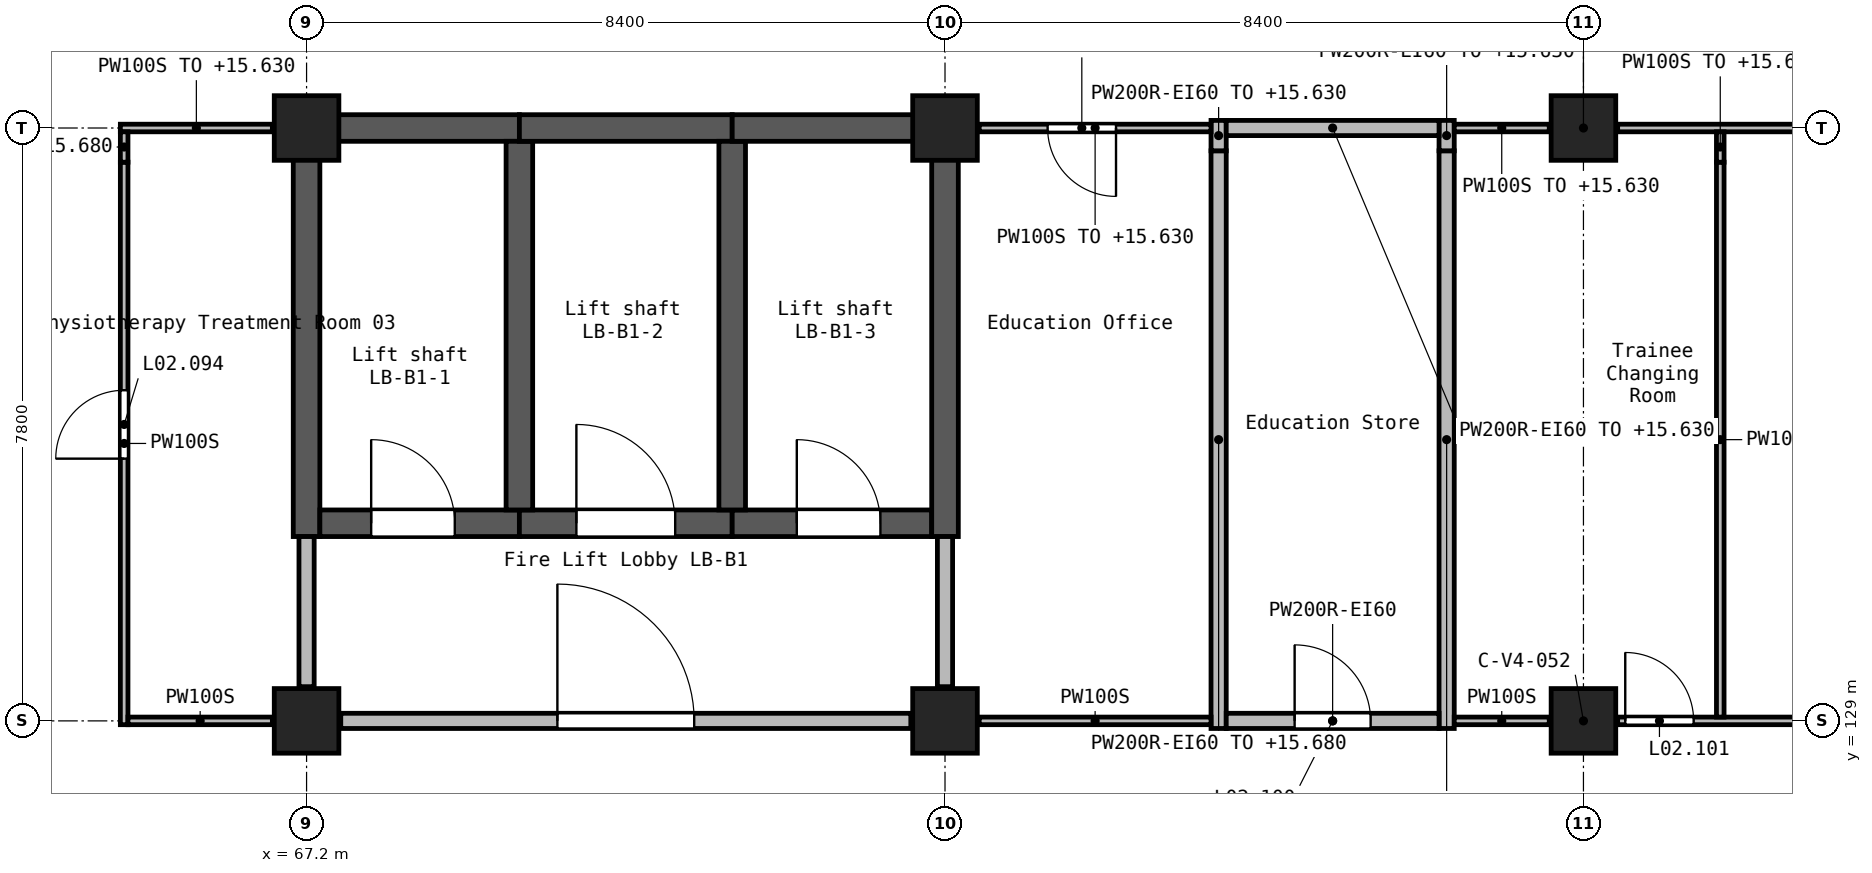
"""IFC4 building model, lengths in metres.
Left out: names, types, materials, properties, quantities, classifications, styles, units other than length and angle.
Written with IfcOpenShell. Run it as: python <this file> out.ifc"""

import sys

from ifc_helpers import new_model, si_unit, direction, frame, frame_2d, origin, origin_2d, place, context, subcontext, project, spatial, rectangle, extrude, element, fill, save


model = new_model("IFC4")
c1 = context("Model", 3, precision=1e-05, world=origin(), true_north=direction((0.0, 1.0)))
c2 = subcontext(c1, "Body", "Model", "MODEL_VIEW")
j1 = project(units=[si_unit("LENGTHUNIT", "METRE"), si_unit("PLANEANGLEUNIT", "RADIAN")], contexts=[c1])
p1 = place(None, origin())
s1 = spatial("IfcSite", under=j1, at=p1, CompositionType="ELEMENT")
p2 = place(p1, origin())
s2 = spatial("IfcBuilding", under=s1, at=p2, CompositionType="ELEMENT")
p3 = place(p2, frame((0.0, 0.0, 12.6)))
s3 = spatial("IfcBuildingStorey", under=s2, at=p3, CompositionType="ELEMENT", Elevation=12.6)
for number, where, z_axis, x_axis in (
    (1, (67.2, 129.0, 0.0), (0.0, 0.0, 1.0), (1.0, 0.0, 0.0)),
    (2, (67.2, 136.8, 0.0), (0.0, 0.0, 1.0), (1.0, 0.0, 0.0)),
    (3, (75.6, 129.0, 0.0), (0.0, 0.0, 1.0), (1.0, 0.0, 0.0)),
    (4, (75.6, 136.8, 0.0), (0.0, 0.0, 1.0), (1.0, 0.0, 0.0)),
    (5, (84.0, 129.0, 0.0), (0.0, 0.0, 1.0), (1.0, 0.0, 0.0)),
    (6, (84.0, 136.8, 0.0), (0.0, 0.0, 1.0), (1.0, 0.0, 0.0)),
):
    element("IfcColumn", number, at=place(p3, frame(where, z_axis=z_axis, x_axis=x_axis)), inside=s3, PredefinedType="COLUMN", context=c2, shape_type="SweptSolid", body=[
        extrude(rectangle(XDim=0.85, YDim=0.85, at=origin_2d()), origin(), (0.0, 0.0, 1.0), 4.2),
    ])
p4 = place(p3, frame((67.025, 136.8, 0.0), z_axis=(0.0, 0.0, 1.0), x_axis=(1.0, 0.0, 0.0)))
e7 = element("IfcWall", 7, at=p4, inside=s3, PredefinedType="SHEAR", context=c2, shape_type="SweptSolid", body=[
    extrude(rectangle(XDim=2.975, YDim=0.35, at=frame_2d((1.488, 0.0))), origin(), (0.0, 0.0, 1.0), 4.2),
])
p5 = place(p3, frame((67.2, 131.425, 0.0), z_axis=(0.0, 0.0, 1.0), x_axis=(0.0, 1.0, 0.0)))
e8 = element("IfcWall", 8, at=p5, inside=s3, PredefinedType="SHEAR", context=c2, shape_type="SweptSolid", body=[
    extrude(rectangle(XDim=5.2, YDim=0.35, at=frame_2d((2.6, 0.0))), origin(), (0.0, 0.0, 1.0), 4.2),
])
p6 = place(p3, frame((67.375, 131.6, 0.0), z_axis=(0.0, 0.0, 1.0), x_axis=(1.0, 0.0, 0.0)))
e9 = element("IfcWall", 9, at=p6, inside=s3, PredefinedType="SHEAR", context=c2, shape_type="SweptSolid", body=[
    extrude(rectangle(XDim=2.625, YDim=0.35, at=frame_2d((1.312, 0.0))), origin(), (0.0, 0.0, 1.0), 4.2),
])
p7 = place(p6, frame((0.675, 0.0, 0.0)))
e10 = element("IfcOpeningElement", 10, at=p7, cuts=e9, PredefinedType="OPENING", context=c2, shape_type="SweptSolid", body=[
    extrude(rectangle(XDim=1.1, YDim=2.1, at=frame_2d((0.55, 1.05))), frame((0.0, 0.185, 0.0), z_axis=(0.0, -1.0, 0.0), x_axis=(1.0, 0.0, 0.0)), (0.0, 0.0, 1.0), 0.37),
])
p8 = place(p3, frame((70.0, 131.6, 0.0), z_axis=(0.0, 0.0, 1.0), x_axis=(1.0, 0.0, 0.0)))
e11 = element("IfcWall", 11, at=p8, inside=s3, PredefinedType="SHEAR", context=c2, shape_type="SweptSolid", body=[
    extrude(rectangle(XDim=2.8, YDim=0.35, at=frame_2d((1.4, 0.0))), origin(), (0.0, 0.0, 1.0), 4.2),
])
p9 = place(p8, frame((0.75, 0.0, 0.0)))
e12 = element("IfcOpeningElement", 12, at=p9, cuts=e11, PredefinedType="OPENING", context=c2, shape_type="SweptSolid", body=[
    extrude(rectangle(XDim=1.3, YDim=2.1, at=frame_2d((0.65, 1.05))), frame((0.0, 0.185, 0.0), z_axis=(0.0, -1.0, 0.0), x_axis=(1.0, 0.0, 0.0)), (0.0, 0.0, 1.0), 0.37),
])
p10 = place(p3, frame((70.0, 131.775, 0.0), z_axis=(0.0, 0.0, 1.0), x_axis=(0.0, 1.0, 0.0)))
e13 = element("IfcWall", 13, at=p10, inside=s3, PredefinedType="SHEAR", context=c2, shape_type="SweptSolid", body=[
    extrude(rectangle(XDim=4.85, YDim=0.35, at=frame_2d((2.425, 0.0))), origin(), (0.0, 0.0, 1.0), 4.2),
])
p11 = place(p3, frame((70.0, 136.8, 0.0), z_axis=(0.0, 0.0, 1.0), x_axis=(1.0, 0.0, 0.0)))
e14 = element("IfcWall", 14, at=p11, inside=s3, PredefinedType="SHEAR", context=c2, shape_type="SweptSolid", body=[
    extrude(rectangle(XDim=2.8, YDim=0.35, at=frame_2d((1.4, 0.0))), origin(), (0.0, 0.0, 1.0), 4.2),
])
p12 = place(p3, frame((72.8, 131.6, 0.0), z_axis=(0.0, 0.0, 1.0), x_axis=(1.0, 0.0, 0.0)))
e15 = element("IfcWall", 15, at=p12, inside=s3, PredefinedType="SHEAR", context=c2, shape_type="SweptSolid", body=[
    extrude(rectangle(XDim=2.625, YDim=0.35, at=frame_2d((1.312, 0.0))), origin(), (0.0, 0.0, 1.0), 4.2),
])
p13 = place(p12, frame((0.85, 0.0, 0.0)))
e16 = element("IfcOpeningElement", 16, at=p13, cuts=e15, PredefinedType="OPENING", context=c2, shape_type="SweptSolid", body=[
    extrude(rectangle(XDim=1.1, YDim=2.1, at=frame_2d((0.55, 1.05))), frame((0.0, 0.185, 0.0), z_axis=(0.0, -1.0, 0.0), x_axis=(1.0, 0.0, 0.0)), (0.0, 0.0, 1.0), 0.37),
])
p14 = place(p3, frame((72.8, 131.775, 0.0), z_axis=(0.0, 0.0, 1.0), x_axis=(0.0, 1.0, 0.0)))
e17 = element("IfcWall", 17, at=p14, inside=s3, PredefinedType="SHEAR", context=c2, shape_type="SweptSolid", body=[
    extrude(rectangle(XDim=4.85, YDim=0.35, at=frame_2d((2.425, 0.0))), origin(), (0.0, 0.0, 1.0), 4.2),
])
p15 = place(p3, frame((72.8, 136.8, 0.0), z_axis=(0.0, 0.0, 1.0), x_axis=(1.0, 0.0, 0.0)))
e18 = element("IfcWall", 18, at=p15, inside=s3, PredefinedType="SHEAR", context=c2, shape_type="SweptSolid", body=[
    extrude(rectangle(XDim=2.625, YDim=0.35, at=frame_2d((1.312, 0.0))), origin(), (0.0, 0.0, 1.0), 4.2),
])
p16 = place(p3, frame((75.6, 131.425, 0.0), z_axis=(0.0, 0.0, 1.0), x_axis=(0.0, 1.0, 0.0)))
e19 = element("IfcWall", 19, at=p16, inside=s3, PredefinedType="SHEAR", context=c2, shape_type="SweptSolid", body=[
    extrude(rectangle(XDim=5.55, YDim=0.35, at=frame_2d((2.775, 0.0))), origin(), (0.0, 0.0, 1.0), 4.2),
])
p17 = place(p3, frame((67.65, 129.0, 0.0), z_axis=(0.0, 0.0, 1.0), x_axis=(1.0, 0.0, 0.0)))
e20 = element("IfcWall", 20, at=p17, inside=s3, PredefinedType="SOLIDWALL", context=c2, shape_type="SweptSolid", body=[
    extrude(rectangle(XDim=7.5, YDim=0.2, at=frame_2d((3.75, 0.0))), origin(), (0.0, 0.0, 1.0), 3.85),
])
p18 = place(p17, frame((2.85, 0.0, 0.0)))
e21 = element("IfcOpeningElement", 21, at=p18, cuts=e20, PredefinedType="OPENING", context=c2, shape_type="SweptSolid", body=[
    extrude(rectangle(XDim=1.8, YDim=2.1, at=frame_2d((0.9, 1.05))), frame((0.0, 0.11, 0.0), z_axis=(0.0, -1.0, 0.0), x_axis=(1.0, 0.0, 0.0)), (0.0, 0.0, 1.0), 0.22),
])
p19 = place(p3, frame((79.2, 128.9, 0.0), z_axis=(0.0, 0.0, 1.0), x_axis=(0.0, 1.0, 0.0)))
e22 = element("IfcWall", 22, at=p19, inside=s3, PredefinedType="SOLIDWALL", context=c2, shape_type="SweptSolid", body=[
    extrude(rectangle(XDim=7.6, YDim=0.2, at=frame_2d((3.8, 0.0))), origin(), (0.0, 0.0, 1.0), 3.08),
])
p20 = place(p3, frame((79.2, 136.5, 0.0), z_axis=(0.0, 0.0, 1.0), x_axis=(0.0, 1.0, 0.0)))
e23 = element("IfcWall", 23, at=p20, inside=s3, PredefinedType="SOLIDWALL", context=c2, shape_type="SweptSolid", body=[
    extrude(rectangle(XDim=0.4, YDim=0.2, at=frame_2d((0.2, 0.0))), origin(), (0.0, 0.0, 1.0), 3.03),
])
p21 = place(p3, frame((82.2, 128.9, 0.0), z_axis=(0.0, 0.0, 1.0), x_axis=(0.0, 1.0, 0.0)))
e24 = element("IfcWall", 24, at=p21, inside=s3, PredefinedType="SOLIDWALL", context=c2, shape_type="SweptSolid", body=[
    extrude(rectangle(XDim=7.6, YDim=0.2, at=frame_2d((3.8, 0.0))), origin(), (0.0, 0.0, 1.0), 3.08),
])
p22 = place(p3, frame((82.2, 136.5, 0.0), z_axis=(0.0, 0.0, 1.0), x_axis=(0.0, 1.0, 0.0)))
e25 = element("IfcWall", 25, at=p22, inside=s3, PredefinedType="SOLIDWALL", context=c2, shape_type="SweptSolid", body=[
    extrude(rectangle(XDim=0.4, YDim=0.2, at=frame_2d((0.2, 0.0))), origin(), (0.0, 0.0, 1.0), 3.03),
])
p23 = place(p3, frame((79.3, 129.0, 0.0), z_axis=(0.0, 0.0, 1.0), x_axis=(1.0, 0.0, 0.0)))
e26 = element("IfcWall", 26, at=p23, inside=s3, PredefinedType="SOLIDWALL", context=c2, shape_type="SweptSolid", body=[
    extrude(rectangle(XDim=2.8, YDim=0.2, at=frame_2d((1.4, 0.0))), origin(), (0.0, 0.0, 1.0), 3.85),
])
p24 = place(p23, frame((0.9, 0.0, 0.0)))
e27 = element("IfcOpeningElement", 27, at=p24, cuts=e26, PredefinedType="OPENING", context=c2, shape_type="SweptSolid", body=[
    extrude(rectangle(XDim=1.0, YDim=2.1, at=frame_2d((0.5, 1.05))), frame((0.0, 0.11, 0.0), z_axis=(0.0, -1.0, 0.0), x_axis=(1.0, 0.0, 0.0)), (0.0, 0.0, 1.0), 0.22),
])
p25 = place(p3, frame((79.3, 136.8, 0.0), z_axis=(0.0, 0.0, 1.0), x_axis=(1.0, 0.0, 0.0)))
e28 = element("IfcWall", 28, at=p25, inside=s3, PredefinedType="SOLIDWALL", context=c2, shape_type="SweptSolid", body=[
    extrude(rectangle(XDim=2.8, YDim=0.2, at=frame_2d((1.4, 0.0))), origin(), (0.0, 0.0, 1.0), 3.03),
])
for number, where, z_axis, x_axis in (
    (29, (67.2, 129.45, 0.0), (0.0, 0.0, 1.0), (0.0, 1.0, 0.0)),
    (30, (75.6, 129.45, 0.0), (0.0, 0.0, 1.0), (0.0, 1.0, 0.0)),
):
    element("IfcWall", number, at=place(p3, frame(where, z_axis=z_axis, x_axis=x_axis)), inside=s3, PredefinedType="SOLIDWALL", context=c2, shape_type="SweptSolid", body=[
        extrude(rectangle(XDim=1.975, YDim=0.2, at=frame_2d((0.988, 0.0))), origin(), (0.0, 0.0, 1.0), 3.85),
    ])
p26 = place(p3, frame((79.1, 136.8, 0.0), z_axis=(0.0, 0.0, 1.0), x_axis=(-1.0, 0.0, 0.0)))
e31 = element("IfcWall", 31, at=p26, inside=s3, PredefinedType="PARTITIONING", context=c2, shape_type="SweptSolid", body=[
    extrude(rectangle(XDim=3.05, YDim=0.1, at=frame_2d((1.525, 0.0))), origin(), (0.0, 0.0, 1.0), 3.03),
])
p27 = place(p26, frame((1.25, 0.0, 0.0)))
e32 = element("IfcOpeningElement", 32, at=p27, cuts=e31, PredefinedType="OPENING", context=c2, shape_type="SweptSolid", body=[
    extrude(rectangle(XDim=0.9, YDim=2.1, at=frame_2d((0.45, 1.05))), frame((0.0, 0.06, 0.0), z_axis=(0.0, -1.0, 0.0), x_axis=(1.0, 0.0, 0.0)), (0.0, 0.0, 1.0), 0.12),
])
p28 = place(p3, frame((66.75, 136.8, 0.0), z_axis=(0.0, 0.0, 1.0), x_axis=(-1.0, 0.0, 0.0)))
e33 = element("IfcWall", 33, at=p28, inside=s3, PredefinedType="PARTITIONING", context=c2, shape_type="SweptSolid", body=[
    extrude(rectangle(XDim=2.0, YDim=0.1, at=frame_2d((1.0, 0.0))), origin(), (0.0, 0.0, 1.0), 3.03),
])
p29 = place(p3, frame((82.3, 129.0, 0.0), z_axis=(0.0, 0.0, 1.0), x_axis=(1.0, 0.0, 0.0)))
e34 = element("IfcWall", 34, at=p29, inside=s3, PredefinedType="PARTITIONING", context=c2, shape_type="SweptSolid", body=[
    extrude(rectangle(XDim=1.25, YDim=0.1, at=frame_2d((0.625, 0.0))), origin(), (0.0, 0.0, 1.0), 3.85),
])
p30 = place(p3, frame((84.45, 129.0, 0.0), z_axis=(0.0, 0.0, 1.0), x_axis=(1.0, 0.0, 0.0)))
e35 = element("IfcWall", 35, at=p30, inside=s3, PredefinedType="PARTITIONING", context=c2, shape_type="SweptSolid", body=[
    extrude(rectangle(XDim=7.5, YDim=0.1, at=frame_2d((3.75, 0.0))), origin(), (0.0, 0.0, 1.0), 3.85),
])
p31 = place(p30, frame((0.1, 0.0, 0.0)))
e36 = element("IfcOpeningElement", 36, at=p31, cuts=e35, PredefinedType="OPENING", context=c2, shape_type="SweptSolid", body=[
    extrude(rectangle(XDim=0.9, YDim=2.1, at=frame_2d((0.45, 1.05))), frame((0.0, 0.06, 0.0), z_axis=(0.0, -1.0, 0.0), x_axis=(1.0, 0.0, 0.0)), (0.0, 0.0, 1.0), 0.12),
])
p32 = place(p30, frame((5.4, 0.0, 0.0)))
e37 = element("IfcOpeningElement", 37, at=p32, cuts=e35, PredefinedType="OPENING", context=c2, shape_type="SweptSolid", body=[
    extrude(rectangle(XDim=0.9, YDim=2.1, at=frame_2d((0.45, 1.05))), frame((0.0, 0.06, 0.0), z_axis=(0.0, -1.0, 0.0), x_axis=(1.0, 0.0, 0.0)), (0.0, 0.0, 1.0), 0.12),
])
p33 = place(p3, frame((82.3, 136.8, 0.0), z_axis=(0.0, 0.0, 1.0), x_axis=(1.0, 0.0, 0.0)))
e38 = element("IfcWall", 38, at=p33, inside=s3, PredefinedType="PARTITIONING", context=c2, shape_type="SweptSolid", body=[
    extrude(rectangle(XDim=1.25, YDim=0.1, at=frame_2d((0.625, 0.0))), origin(), (0.0, 0.0, 1.0), 3.03),
])
p34 = place(p3, frame((84.45, 136.8, 0.0), z_axis=(0.0, 0.0, 1.0), x_axis=(1.0, 0.0, 0.0)))
e39 = element("IfcWall", 39, at=p34, inside=s3, PredefinedType="PARTITIONING", context=c2, shape_type="SweptSolid", body=[
    extrude(rectangle(XDim=7.5, YDim=0.1, at=frame_2d((3.75, 0.0))), origin(), (0.0, 0.0, 1.0), 3.03),
])
p35 = place(p3, frame((64.8, 128.95, 0.0), z_axis=(0.0, 0.0, 1.0), x_axis=(0.0, 1.0, 0.0)))
e40 = element("IfcWall", 40, at=p35, inside=s3, PredefinedType="PARTITIONING", context=c2, shape_type="SweptSolid", body=[
    extrude(rectangle(XDim=7.4, YDim=0.1, at=frame_2d((3.7, 0.0))), origin(), (0.0, 0.0, 1.0), 3.85),
])
p36 = place(p35, frame((3.5, 0.0, 0.0)))
e41 = element("IfcOpeningElement", 41, at=p36, cuts=e40, PredefinedType="OPENING", context=c2, shape_type="SweptSolid", body=[
    extrude(rectangle(XDim=0.9, YDim=2.1, at=frame_2d((0.45, 1.05))), frame((0.0, 0.06, 0.0), z_axis=(0.0, -1.0, 0.0), x_axis=(1.0, 0.0, 0.0)), (0.0, 0.0, 1.0), 0.12),
])
p37 = place(p3, frame((64.8, 136.35, 0.0), z_axis=(0.0, 0.0, 1.0), x_axis=(0.0, 1.0, 0.0)))
e42 = element("IfcWall", 42, at=p37, inside=s3, PredefinedType="PARTITIONING", context=c2, shape_type="SweptSolid", body=[
    extrude(rectangle(XDim=0.4, YDim=0.1, at=frame_2d((0.2, 0.0))), origin(), (0.0, 0.0, 1.0), 3.08),
])
p38 = place(p3, frame((85.8, 129.05, 0.0), z_axis=(0.0, 0.0, 1.0), x_axis=(0.0, 1.0, 0.0)))
e43 = element("IfcWall", 43, at=p38, inside=s3, PredefinedType="PARTITIONING", context=c2, shape_type="SweptSolid", body=[
    extrude(rectangle(XDim=7.3, YDim=0.1, at=frame_2d((3.65, 0.0))), origin(), (0.0, 0.0, 1.0), 3.85),
])
p39 = place(p3, frame((85.8, 136.35, 0.0), z_axis=(0.0, 0.0, 1.0), x_axis=(0.0, 1.0, 0.0)))
e44 = element("IfcWall", 44, at=p39, inside=s3, PredefinedType="PARTITIONING", context=c2, shape_type="SweptSolid", body=[
    extrude(rectangle(XDim=0.4, YDim=0.1, at=frame_2d((0.2, 0.0))), origin(), (0.0, 0.0, 1.0), 3.08),
])
p40 = place(p3, frame((76.05, 129.0, 0.0), z_axis=(0.0, 0.0, 1.0), x_axis=(1.0, 0.0, 0.0)))
e45 = element("IfcWall", 45, at=p40, inside=s3, PredefinedType="PARTITIONING", context=c2, shape_type="SweptSolid", body=[
    extrude(rectangle(XDim=3.05, YDim=0.1, at=frame_2d((1.525, 0.0))), origin(), (0.0, 0.0, 1.0), 3.85),
])
p41 = place(p3, frame((64.85, 129.0, 0.0), z_axis=(0.0, 0.0, 1.0), x_axis=(1.0, 0.0, 0.0)))
e46 = element("IfcWall", 46, at=p41, inside=s3, PredefinedType="PARTITIONING", context=c2, shape_type="SweptSolid", body=[
    extrude(rectangle(XDim=1.9, YDim=0.1, at=frame_2d((0.95, 0.0))), origin(), (0.0, 0.0, 1.0), 3.85),
])
p42 = place(p18, origin())
e47 = element("IfcDoor", 47, at=p42, inside=s3, OperationType="DOUBLE_DOOR_SINGLE_SWING", PredefinedType="DOOR", context=c2, shape_type="SweptSolid", body=[
    extrude(rectangle(XDim=1.8, YDim=2.1, at=frame_2d((0.9, 1.05))), frame((0.0, 0.025, 0.0), z_axis=(0.0, -1.0, 0.0), x_axis=(1.0, 0.0, 0.0)), (0.0, 0.0, 1.0), 0.05),
])
fill(e21, e47)
p43 = place(p36, frame((0.9, 0.0, 0.0), z_axis=(0.0, 0.0, 1.0), x_axis=(-1.0, 0.0, 0.0)))
e48 = element("IfcDoor", 48, at=p43, inside=s3, OperationType="SINGLE_SWING_LEFT", PredefinedType="DOOR", context=c2, shape_type="SweptSolid", body=[
    extrude(rectangle(XDim=0.9, YDim=2.1, at=frame_2d((0.45, 1.05))), frame((0.0, 0.025, 0.0), z_axis=(0.0, -1.0, 0.0), x_axis=(1.0, 0.0, 0.0)), (0.0, 0.0, 1.0), 0.05),
])
fill(e41, e48)
p44 = place(p27, origin())
e49 = element("IfcDoor", 49, at=p44, inside=s3, OperationType="SINGLE_SWING_RIGHT", PredefinedType="DOOR", context=c2, shape_type="SweptSolid", body=[
    extrude(rectangle(XDim=0.9, YDim=2.1, at=frame_2d((0.45, 1.05))), frame((0.0, 0.025, 0.0), z_axis=(0.0, -1.0, 0.0), x_axis=(1.0, 0.0, 0.0)), (0.0, 0.0, 1.0), 0.05),
])
fill(e32, e49)
p45 = place(p24, origin())
e50 = element("IfcDoor", 50, at=p45, inside=s3, OperationType="SINGLE_SWING_LEFT", PredefinedType="DOOR", context=c2, shape_type="SweptSolid", body=[
    extrude(rectangle(XDim=1.0, YDim=2.1, at=frame_2d((0.5, 1.05))), frame((0.0, 0.025, 0.0), z_axis=(0.0, -1.0, 0.0), x_axis=(1.0, 0.0, 0.0)), (0.0, 0.0, 1.0), 0.05),
])
fill(e27, e50)
p46 = place(p31, origin())
e51 = element("IfcDoor", 51, at=p46, inside=s3, OperationType="SINGLE_SWING_LEFT", PredefinedType="DOOR", context=c2, shape_type="SweptSolid", body=[
    extrude(rectangle(XDim=0.9, YDim=2.1, at=frame_2d((0.45, 1.05))), frame((0.0, 0.025, 0.0), z_axis=(0.0, -1.0, 0.0), x_axis=(1.0, 0.0, 0.0)), (0.0, 0.0, 1.0), 0.05),
])
fill(e36, e51)
p47 = place(p7, origin())
e52 = element("IfcDoor", 52, at=p47, inside=s3, OperationType="DOUBLE_DOOR_SLIDING", PredefinedType="DOOR", context=c2, shape_type="SweptSolid", body=[
    extrude(rectangle(XDim=1.1, YDim=2.1, at=frame_2d((0.55, 1.05))), frame((0.0, 0.025, 0.0), z_axis=(0.0, -1.0, 0.0), x_axis=(1.0, 0.0, 0.0)), (0.0, 0.0, 1.0), 0.05),
])
fill(e10, e52)
p48 = place(p9, origin())
e53 = element("IfcDoor", 53, at=p48, inside=s3, OperationType="DOUBLE_DOOR_SLIDING", PredefinedType="DOOR", context=c2, shape_type="SweptSolid", body=[
    extrude(rectangle(XDim=1.3, YDim=2.1, at=frame_2d((0.65, 1.05))), frame((0.0, 0.025, 0.0), z_axis=(0.0, -1.0, 0.0), x_axis=(1.0, 0.0, 0.0)), (0.0, 0.0, 1.0), 0.05),
])
fill(e12, e53)
p49 = place(p13, origin())
e54 = element("IfcDoor", 54, at=p49, inside=s3, OperationType="DOUBLE_DOOR_SLIDING", PredefinedType="DOOR", context=c2, shape_type="SweptSolid", body=[
    extrude(rectangle(XDim=1.1, YDim=2.1, at=frame_2d((0.55, 1.05))), frame((0.0, 0.025, 0.0), z_axis=(0.0, -1.0, 0.0), x_axis=(1.0, 0.0, 0.0)), (0.0, 0.0, 1.0), 0.05),
])
fill(e16, e54)
save(model, sys.argv[1])
